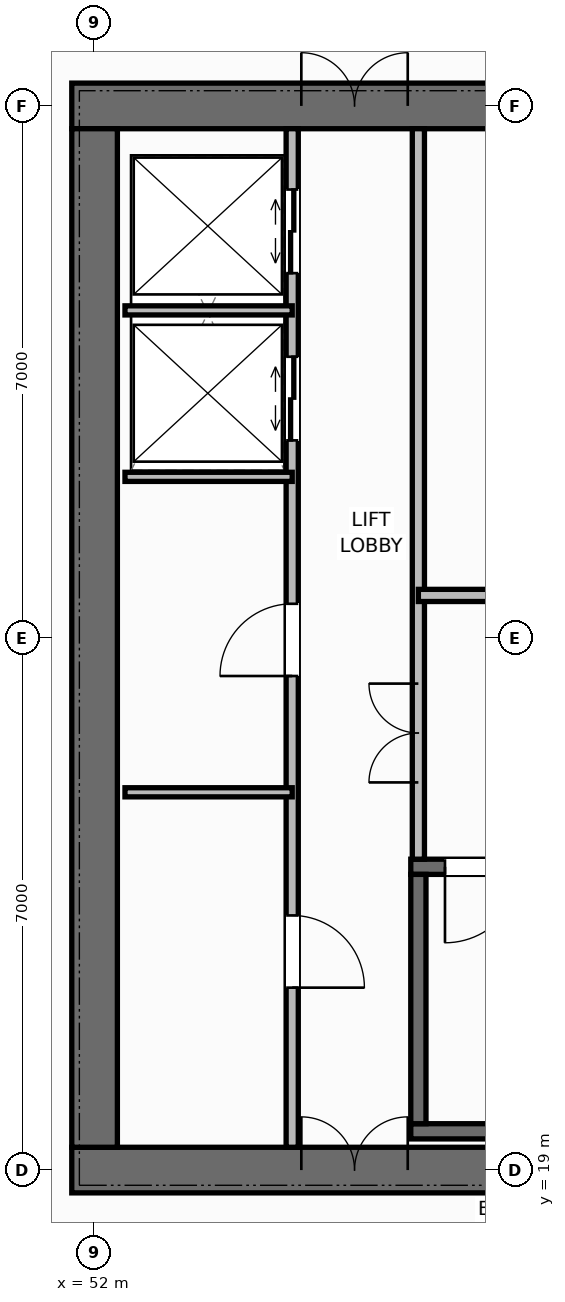
"""IFC4 building model, lengths in metres.
Left out: names, types, materials, properties, quantities, classifications, styles, units other than length and angle.
Written with IfcOpenShell. Run it as: python <this file> out.ifc"""

import sys

from ifc_helpers import new_model, si_unit, direction, frame, frame_2d, origin, place, context, subcontext, project, spatial, rectangle, extrude, element, fill, save


model = new_model("IFC4")
c1 = context("Model", 3, precision=1e-05, world=origin(), true_north=direction((0.0, 1.0)))
c2 = subcontext(c1, "Body", "Model", "MODEL_VIEW")
j1 = project(units=[si_unit("LENGTHUNIT", "METRE"), si_unit("PLANEANGLEUNIT", "RADIAN")], contexts=[c1])
p1 = place(None, origin())
s1 = spatial("IfcSite", under=j1, at=p1, CompositionType="ELEMENT")
p2 = place(p1, origin())
s2 = spatial("IfcBuilding", under=s1, at=p2, CompositionType="ELEMENT")
p3 = place(p2, frame((0.0, 0.0, 197.4)))
s3 = spatial("IfcBuildingStorey", under=s2, at=p3, CompositionType="ELEMENT", Elevation=197.4)
p4 = place(p3, frame((51.7, 19.0, 0.0), z_axis=(0.0, 0.0, 1.0), x_axis=(1.0, 0.0, 0.0)))
e1 = element("IfcWall", 1, at=p4, inside=s3, PredefinedType="SHEAR", context=c2, shape_type="SweptSolid", body=[
    extrude(rectangle(XDim=13.6, YDim=0.6, at=frame_2d((6.8, 0.0))), origin(), (0.0, 0.0, 1.0), 5.0),
])
p5 = place(p4, frame((3.02, 0.0, 0.0)))
e2 = element("IfcOpeningElement", 2, at=p5, cuts=e1, PredefinedType="OPENING", context=c2, shape_type="SweptSolid", body=[
    extrude(rectangle(XDim=1.4, YDim=2.2, at=frame_2d((0.7, 1.1))), frame((0.0, 0.31, 0.0), z_axis=(0.0, -1.0, 0.0), x_axis=(1.0, 0.0, 0.0)), (0.0, 0.0, 1.0), 0.62),
])
p6 = place(p3, frame((51.7, 33.0, 0.0), z_axis=(0.0, 0.0, 1.0), x_axis=(1.0, 0.0, 0.0)))
e3 = element("IfcWall", 3, at=p6, inside=s3, PredefinedType="SHEAR", context=c2, shape_type="SweptSolid", body=[
    extrude(rectangle(XDim=13.6, YDim=0.6, at=frame_2d((6.8, 0.0))), origin(), (0.0, 0.0, 1.0), 5.0),
])
p7 = place(p6, frame((3.02, 0.0, 0.0)))
e4 = element("IfcOpeningElement", 4, at=p7, cuts=e3, PredefinedType="OPENING", context=c2, shape_type="SweptSolid", body=[
    extrude(rectangle(XDim=1.4, YDim=2.2, at=frame_2d((0.7, 1.1))), frame((0.0, 0.31, 0.0), z_axis=(0.0, -1.0, 0.0), x_axis=(1.0, 0.0, 0.0)), (0.0, 0.0, 1.0), 0.62),
])
p8 = place(p6, frame((10.9, 0.0, 0.0)))
e5 = element("IfcOpeningElement", 5, at=p8, cuts=e3, PredefinedType="OPENING", context=c2, shape_type="SweptSolid", body=[
    extrude(rectangle(XDim=0.9, YDim=2.15, at=frame_2d((0.45, 1.075))), frame((0.0, 0.31, 0.0), z_axis=(0.0, -1.0, 0.0), x_axis=(1.0, 0.0, 0.0)), (0.0, 0.0, 1.0), 0.62),
])
p9 = place(p6, frame((6.3, 0.0, 0.0)))
e6 = element("IfcOpeningElement", 6, at=p9, cuts=e3, PredefinedType="OPENING", context=c2, shape_type="SweptSolid", body=[
    extrude(rectangle(XDim=0.95, YDim=2.15, at=frame_2d((0.475, 1.075))), frame((0.0, 0.31, 0.0), z_axis=(0.0, -1.0, 0.0), x_axis=(1.0, 0.0, 0.0)), (0.0, 0.0, 1.0), 0.62),
])
p10 = place(p6, frame((8.75, 0.0, 0.0)))
e7 = element("IfcOpeningElement", 7, at=p10, cuts=e3, PredefinedType="OPENING", context=c2, shape_type="SweptSolid", body=[
    extrude(rectangle(XDim=0.9, YDim=2.15, at=frame_2d((0.45, 1.075))), frame((0.0, 0.31, 0.0), z_axis=(0.0, -1.0, 0.0), x_axis=(1.0, 0.0, 0.0)), (0.0, 0.0, 1.0), 0.62),
])
p11 = place(p3, frame((52.0, 19.3, 0.0), z_axis=(0.0, 0.0, 1.0), x_axis=(0.0, 1.0, 0.0)))
e8 = element("IfcWall", 8, at=p11, inside=s3, PredefinedType="SHEAR", context=c2, shape_type="SweptSolid", body=[
    extrude(rectangle(XDim=13.4, YDim=0.6, at=frame_2d((6.7, 0.0))), origin(), (0.0, 0.0, 1.0), 5.0),
])
p12 = place(p3, frame((56.16, 19.51, 0.0), z_axis=(0.0, 0.0, 1.0), x_axis=(1.0, 0.0, 0.0)))
e9 = element("IfcWall", 9, at=p12, inside=s3, PredefinedType="SHEAR", context=c2, shape_type="SweptSolid", body=[
    extrude(rectangle(XDim=8.43, YDim=0.2, at=frame_2d((4.215, 0.0))), origin(), (0.0, 0.0, 1.0), 5.0),
])
p13 = place(p3, frame((56.16, 22.99, 0.0), z_axis=(0.0, 0.0, 1.0), x_axis=(1.0, 0.0, 0.0)))
e10 = element("IfcWall", 10, at=p13, inside=s3, PredefinedType="SHEAR", context=c2, shape_type="SweptSolid", body=[
    extrude(rectangle(XDim=8.43, YDim=0.2, at=frame_2d((4.215, 0.0))), origin(), (0.0, 0.0, 1.0), 5.0),
])
p14 = place(p13, frame((0.45, 0.0, 0.0)))
e11 = element("IfcOpeningElement", 11, at=p14, cuts=e10, PredefinedType="OPENING", context=c2, shape_type="SweptSolid", body=[
    extrude(rectangle(XDim=1.0, YDim=2.15, at=frame_2d((0.5, 1.075))), frame((0.0, 0.11, 0.0), z_axis=(0.0, -1.0, 0.0), x_axis=(1.0, 0.0, 0.0)), (0.0, 0.0, 1.0), 0.22),
])
p15 = place(p3, frame((56.26, 19.61, 0.0), z_axis=(0.0, 0.0, 1.0), x_axis=(0.0, 1.0, 0.0)))
e12 = element("IfcWall", 12, at=p15, inside=s3, PredefinedType="SHEAR", context=c2, shape_type="SweptSolid", body=[
    extrude(rectangle(XDim=3.28, YDim=0.2, at=frame_2d((1.64, 0.0))), origin(), (0.0, 0.0, 1.0), 5.0),
])
p16 = place(p3, frame((54.6, 19.3, 0.0), z_axis=(0.0, 0.0, 1.0), x_axis=(0.0, 1.0, 0.0)))
e13 = element("IfcWall", 13, at=p16, inside=s3, PredefinedType="STANDARD", context=c2, shape_type="SweptSolid", body=[
    extrude(rectangle(XDim=13.4, YDim=0.16, at=frame_2d((6.7, 0.0))), origin(), (0.0, 0.0, 1.0), 4.78),
])
p17 = place(p16, frame((2.1, 0.0, 0.0)))
e14 = element("IfcOpeningElement", 14, at=p17, cuts=e13, PredefinedType="OPENING", context=c2, shape_type="SweptSolid", body=[
    extrude(rectangle(XDim=0.95, YDim=2.15, at=frame_2d((0.475, 1.075))), frame((0.0, 0.09, 0.0), z_axis=(0.0, -1.0, 0.0), x_axis=(1.0, 0.0, 0.0)), (0.0, 0.0, 1.0), 0.18),
])
p18 = place(p16, frame((6.2, 0.0, 0.0)))
e15 = element("IfcOpeningElement", 15, at=p18, cuts=e13, PredefinedType="OPENING", context=c2, shape_type="SweptSolid", body=[
    extrude(rectangle(XDim=0.95, YDim=2.15, at=frame_2d((0.475, 1.075))), frame((0.0, 0.09, 0.0), z_axis=(0.0, -1.0, 0.0), x_axis=(1.0, 0.0, 0.0)), (0.0, 0.0, 1.0), 0.18),
])
p19 = place(p16, frame((9.3, 0.0, 0.0)))
e16 = element("IfcOpeningElement", 16, at=p19, cuts=e13, PredefinedType="OPENING", context=c2, shape_type="SweptSolid", body=[
    extrude(rectangle(XDim=1.1, YDim=2.2, at=frame_2d((0.55, 1.1))), frame((0.0, 0.09, 0.0), z_axis=(0.0, -1.0, 0.0), x_axis=(1.0, 0.0, 0.0)), (0.0, 0.0, 1.0), 0.18),
])
p20 = place(p16, frame((11.5, 0.0, 0.0)))
e17 = element("IfcOpeningElement", 17, at=p20, cuts=e13, PredefinedType="OPENING", context=c2, shape_type="SweptSolid", body=[
    extrude(rectangle(XDim=1.1, YDim=2.2, at=frame_2d((0.55, 1.1))), frame((0.0, 0.09, 0.0), z_axis=(0.0, -1.0, 0.0), x_axis=(1.0, 0.0, 0.0)), (0.0, 0.0, 1.0), 0.18),
])
p21 = place(p3, frame((56.26, 23.09, 0.0), z_axis=(0.0, 0.0, 1.0), x_axis=(0.0, 1.0, 0.0)))
e18 = element("IfcWall", 18, at=p21, inside=s3, PredefinedType="STANDARD", context=c2, shape_type="SweptSolid", body=[
    extrude(rectangle(XDim=9.61, YDim=0.16, at=frame_2d((4.805, 0.0))), origin(), (0.0, 0.0, 1.0), 4.78),
])
p22 = place(p21, frame((1.01, 0.0, 0.0)))
e19 = element("IfcOpeningElement", 19, at=p22, cuts=e18, PredefinedType="OPENING", context=c2, shape_type="SweptSolid", body=[
    extrude(rectangle(XDim=1.3, YDim=2.2, at=frame_2d((0.65, 1.1))), frame((0.0, 0.09, 0.0), z_axis=(0.0, -1.0, 0.0), x_axis=(1.0, 0.0, 0.0)), (0.0, 0.0, 1.0), 0.18),
])
for number, where, z_axis, x_axis in (
    (20, (52.4, 23.97, 0.0), (0.0, 0.0, 1.0), (1.0, 0.0, 0.0)),
    (21, (52.4, 28.12, 0.0), (0.0, 0.0, 1.0), (1.0, 0.0, 0.0)),
    (22, (52.4, 30.31, 0.0), (0.0, 0.0, 1.0), (1.0, 0.0, 0.0)),
):
    element("IfcWall", number, at=place(p3, frame(where, z_axis=z_axis, x_axis=x_axis)), inside=s3, PredefinedType="PARTITIONING", context=c2, shape_type="SweptSolid", body=[
        extrude(rectangle(XDim=2.2, YDim=0.12, at=frame_2d((1.1, 0.0))), origin(), (0.0, 0.0, 1.0), 4.78),
    ])
p23 = place(p3, frame((56.26, 26.56, 0.0), z_axis=(0.0, 0.0, 1.0), x_axis=(1.0, 0.0, 0.0)))
e23 = element("IfcWall", 23, at=p23, inside=s3, PredefinedType="STANDARD", context=c2, shape_type="SweptSolid", body=[
    extrude(rectangle(XDim=8.34, YDim=0.16, at=frame_2d((4.17, 0.0))), origin(), (0.0, 0.0, 1.0), 4.78),
])
p24 = place(p5, origin())
e24 = element("IfcDoor", 24, at=p24, inside=s3, OperationType="DOUBLE_DOOR_SINGLE_SWING", PredefinedType="DOOR", context=c2, shape_type="SweptSolid", body=[
    extrude(rectangle(XDim=1.4, YDim=2.2, at=frame_2d((0.7, 1.1))), frame((0.0, 0.075, 0.0), z_axis=(0.0, -1.0, 0.0), x_axis=(1.0, 0.0, 0.0)), (0.0, 0.0, 1.0), 0.05),
])
fill(e2, e24)
p25 = place(p7, origin())
e25 = element("IfcDoor", 25, at=p25, inside=s3, OperationType="DOUBLE_DOOR_SINGLE_SWING", PredefinedType="DOOR", context=c2, shape_type="SweptSolid", body=[
    extrude(rectangle(XDim=1.4, YDim=2.2, at=frame_2d((0.7, 1.1))), frame((0.0, -0.025, 0.0), z_axis=(0.0, -1.0, 0.0), x_axis=(1.0, 0.0, 0.0)), (0.0, 0.0, 1.0), 0.05),
])
fill(e4, e25)
p26 = place(p17, origin())
e26 = element("IfcDoor", 26, at=p26, inside=s3, OperationType="SINGLE_SWING_RIGHT", PredefinedType="DOOR", context=c2, shape_type="SweptSolid", body=[
    extrude(rectangle(XDim=0.95, YDim=2.15, at=frame_2d((0.475, 1.075))), frame((0.0, 0.025, 0.0), z_axis=(0.0, -1.0, 0.0), x_axis=(1.0, 0.0, 0.0)), (0.0, 0.0, 1.0), 0.05),
])
fill(e14, e26)
p27 = place(p18, origin())
e27 = element("IfcDoor", 27, at=p27, inside=s3, OperationType="SINGLE_SWING_LEFT", PredefinedType="DOOR", context=c2, shape_type="SweptSolid", body=[
    extrude(rectangle(XDim=0.95, YDim=2.15, at=frame_2d((0.475, 1.075))), frame((0.0, 0.025, 0.0), z_axis=(0.0, -1.0, 0.0), x_axis=(1.0, 0.0, 0.0)), (0.0, 0.0, 1.0), 0.05),
])
fill(e15, e27)
p28 = place(p19, origin())
e28 = element("IfcDoor", 28, at=p28, inside=s3, OperationType="DOUBLE_DOOR_SLIDING", PredefinedType="DOOR", context=c2, shape_type="SweptSolid", body=[
    extrude(rectangle(XDim=1.1, YDim=2.2, at=frame_2d((0.55, 1.1))), frame((0.0, 0.025, 0.0), z_axis=(0.0, -1.0, 0.0), x_axis=(1.0, 0.0, 0.0)), (0.0, 0.0, 1.0), 0.05),
])
fill(e16, e28)
p29 = place(p20, origin())
e29 = element("IfcDoor", 29, at=p29, inside=s3, OperationType="DOUBLE_DOOR_SLIDING", PredefinedType="DOOR", context=c2, shape_type="SweptSolid", body=[
    extrude(rectangle(XDim=1.1, YDim=2.2, at=frame_2d((0.55, 1.1))), frame((0.0, 0.025, 0.0), z_axis=(0.0, -1.0, 0.0), x_axis=(1.0, 0.0, 0.0)), (0.0, 0.0, 1.0), 0.05),
])
fill(e17, e29)
p30 = place(p14, origin())
e30 = element("IfcDoor", 30, at=p30, inside=s3, OperationType="SINGLE_SWING_RIGHT", PredefinedType="DOOR", context=c2, shape_type="SweptSolid", body=[
    extrude(rectangle(XDim=1.0, YDim=2.15, at=frame_2d((0.5, 1.075))), frame((0.0, 0.025, 0.0), z_axis=(0.0, -1.0, 0.0), x_axis=(1.0, 0.0, 0.0)), (0.0, 0.0, 1.0), 0.05),
])
fill(e11, e30)
p31 = place(p22, origin())
e31 = element("IfcDoor", 31, at=p31, inside=s3, OperationType="DOUBLE_DOOR_SINGLE_SWING", PredefinedType="DOOR", context=c2, shape_type="SweptSolid", body=[
    extrude(rectangle(XDim=1.3, YDim=2.2, at=frame_2d((0.65, 1.1))), frame((0.0, 0.025, 0.0), z_axis=(0.0, -1.0, 0.0), x_axis=(1.0, 0.0, 0.0)), (0.0, 0.0, 1.0), 0.05),
])
fill(e19, e31)
save(model, sys.argv[1])
